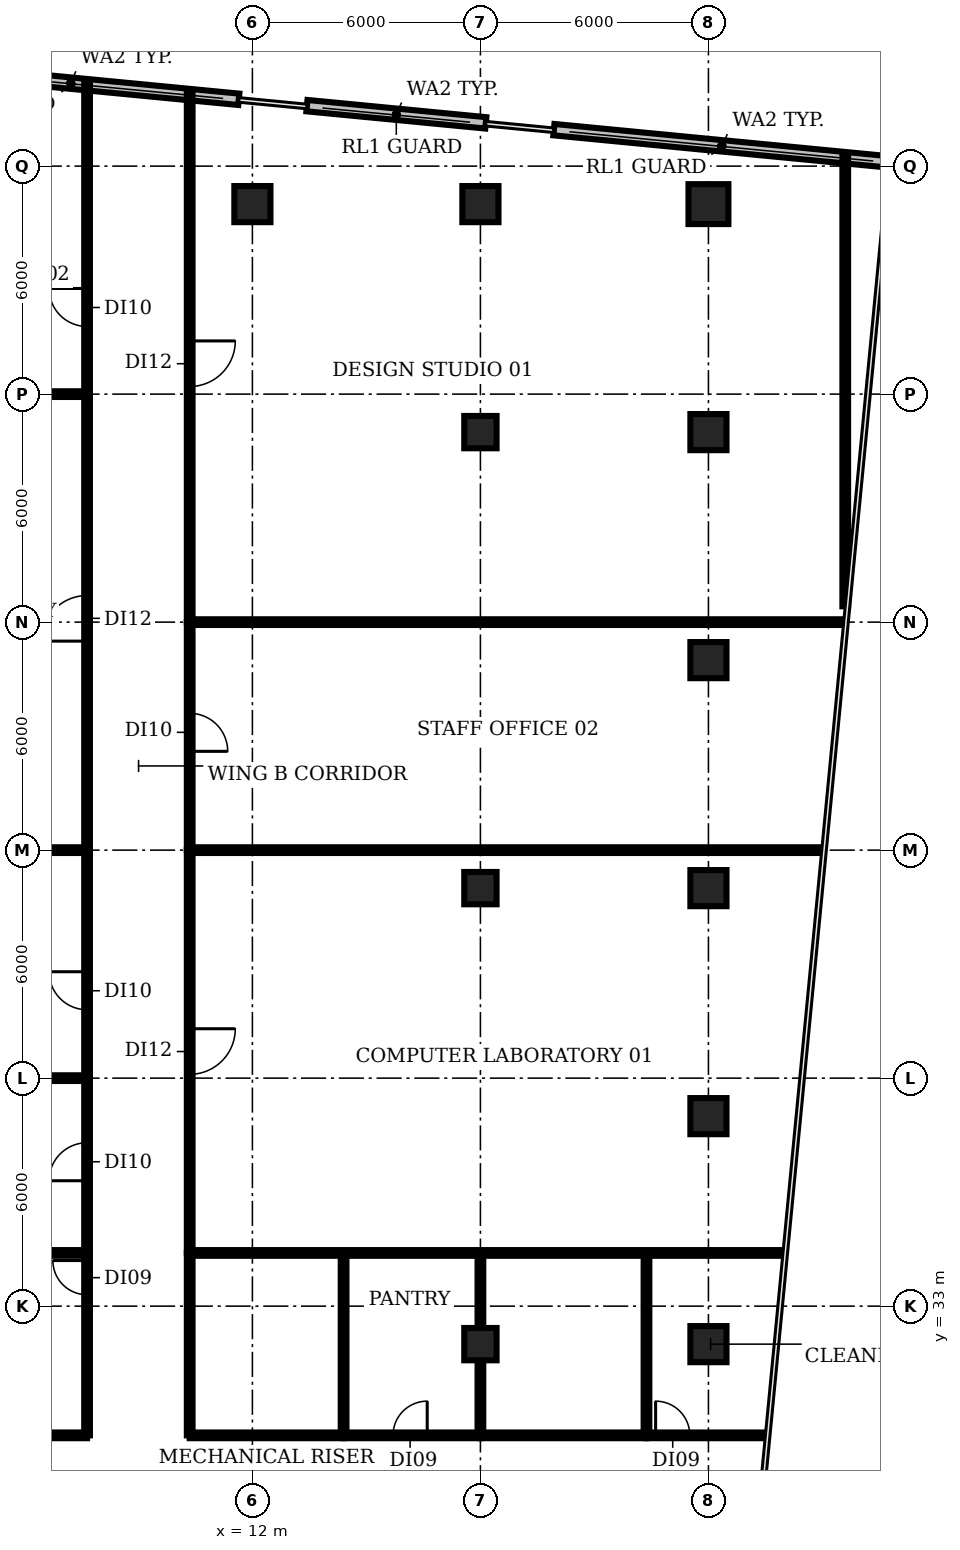
"""IFC4 building model, lengths in metres.
Left out: names, types, materials, properties, quantities, classifications, styles, units other than length and angle.
Written with IfcOpenShell. Run it as: python <this file> out.ifc"""

import sys

from ifc_helpers import new_model, si_unit, direction, frame, frame_2d, origin, origin_2d, place, context, subcontext, project, spatial, rectangle, circle, extrude, element, fill, save


model = new_model("IFC4")
c1 = context("Model", 3, precision=1e-05, world=origin(), true_north=direction((0.0, 1.0)))
c2 = subcontext(c1, "Body", "Model", "MODEL_VIEW")
j1 = project(units=[si_unit("LENGTHUNIT", "METRE"), si_unit("PLANEANGLEUNIT", "RADIAN")], contexts=[c1])
p1 = place(None, origin())
s1 = spatial("IfcSite", under=j1, at=p1, CompositionType="ELEMENT")
p2 = place(p1, origin())
s2 = spatial("IfcBuilding", under=s1, at=p2, CompositionType="ELEMENT")
p3 = place(p2, frame((0.0, 0.0, 29.0)))
s3 = spatial("IfcBuildingStorey", under=s2, at=p3, CompositionType="ELEMENT", Elevation=29.0)
p4 = place(p3, frame((12.0, 62.0, 0.0), z_axis=(0.0, 0.0, 1.0), x_axis=(1.0, 0.0, 0.0)))
e1 = element("IfcColumn", 1, at=p4, inside=s3, PredefinedType="COLUMN", context=c2, shape_type="SweptSolid", body=[
    extrude(rectangle(XDim=0.95, YDim=0.95, at=origin_2d()), origin(), (0.0, 0.0, 1.0), 3.85),
])
for number, where, z_axis, x_axis in (
    (2, (18.0, 32.0, 0.0), (0.0, 0.0, 1.0), (1.0, 0.0, 0.0)),
    (3, (18.0, 44.0, 0.0), (0.0, 0.0, 1.0), (1.0, 0.0, 0.0)),
    (4, (18.0, 56.0, 0.0), (0.0, 0.0, 1.0), (1.0, 0.0, 0.0)),
):
    element("IfcColumn", number, at=place(p3, frame(where, z_axis=z_axis, x_axis=x_axis)), inside=s3, PredefinedType="COLUMN", context=c2, shape_type="SweptSolid", body=[
        extrude(rectangle(XDim=0.85, YDim=0.85, at=origin_2d()), origin(), (0.0, 0.0, 1.0), 3.85),
    ])
for number, where, z_axis, x_axis in (
    (5, (18.0, 62.0, 0.0), (0.0, 0.0, 1.0), (1.0, 0.0, 0.0)),
    (6, (24.0, 32.0, 0.0), (0.0, 0.0, 1.0), (1.0, 0.0, 0.0)),
    (7, (24.0, 38.0, 0.0), (0.0, 0.0, 1.0), (1.0, 0.0, 0.0)),
    (8, (24.0, 44.0, 0.0), (0.0, 0.0, 1.0), (1.0, 0.0, 0.0)),
    (9, (24.0, 50.0, 0.0), (0.0, 0.0, 1.0), (1.0, 0.0, 0.0)),
    (10, (24.0, 56.0, 0.0), (0.0, 0.0, 1.0), (1.0, 0.0, 0.0)),
):
    element("IfcColumn", number, at=place(p3, frame(where, z_axis=z_axis, x_axis=x_axis)), inside=s3, PredefinedType="COLUMN", context=c2, shape_type="SweptSolid", body=[
        extrude(rectangle(XDim=0.95, YDim=0.95, at=origin_2d()), origin(), (0.0, 0.0, 1.0), 3.85),
    ])
p5 = place(p3, frame((24.0, 62.0, 0.0), z_axis=(0.0, 0.0, 1.0), x_axis=(1.0, 0.0, 0.0)))
e11 = element("IfcColumn", 11, at=p5, inside=s3, PredefinedType="COLUMN", context=c2, shape_type="SweptSolid", body=[
    extrude(circle(Radius=0.525, at=origin_2d()), origin(), (0.0, 0.0, 1.0), 3.85),
])
p6 = place(p3, frame((28.786, 63.107, 0.0), z_axis=(0.0, 0.0, 1.0), x_axis=(-0.995397352985, 0.095833760598, 0.0)))
e12 = element("IfcWall", 12, at=p6, inside=s3, PredefinedType="SOLIDWALL", context=c2, shape_type="SweptSolid", body=[
    extrude(rectangle(XDim=8.894, YDim=0.3, at=frame_2d((4.447, 0.0))), origin(), (0.0, 0.0, 1.0), 3.85),
])
p7 = place(p3, frame((18.142, 64.138, 0.0), z_axis=(0.0, 0.0, 1.0), x_axis=(-0.99539842865, 0.095822587322, 0.0)))
e13 = element("IfcWall", 13, at=p7, inside=s3, PredefinedType="SOLIDWALL", context=c2, shape_type="SweptSolid", body=[
    extrude(rectangle(XDim=4.729, YDim=0.3, at=frame_2d((2.364, 0.0))), origin(), (0.0, 0.0, 1.0), 3.85),
])
p8 = place(p3, frame((11.643, 64.758, 0.0), z_axis=(0.0, 0.0, 1.0), x_axis=(-0.995397352985, 0.095833760598, 0.0)))
e14 = element("IfcWall", 14, at=p8, inside=s3, PredefinedType="SOLIDWALL", context=c2, shape_type="SweptSolid", body=[
    extrude(rectangle(XDim=8.894, YDim=0.3, at=frame_2d((4.447, 0.0))), origin(), (0.0, 0.0, 1.0), 3.85),
])
for number, where, z_axis, x_axis in (
    (15, (-1.01, 34.4, 0.0), (0.0, 0.0, 1.0), (1.0, 0.0, 0.0)),
    (16, (-1.01, 39.0, 0.0), (0.0, 0.0, 1.0), (1.0, 0.0, 0.0)),
    (17, (-1.01, 45.0, 0.0), (0.0, 0.0, 1.0), (1.0, 0.0, 0.0)),
    (18, (-1.01, 57.0, 0.0), (0.0, 0.0, 1.0), (1.0, 0.0, 0.0)),
):
    element("IfcWall", number, at=place(p3, frame(where, z_axis=z_axis, x_axis=x_axis)), inside=s3, PredefinedType="PARTITIONING", context=c2, shape_type="SweptSolid", body=[
        extrude(rectangle(XDim=8.66, YDim=0.15, at=frame_2d((4.33, 0.0))), origin(), (0.0, 0.0, 1.0), 2.83),
    ])
p9 = place(p3, frame((2.4, 29.6, 0.0), z_axis=(0.0, 0.0, 1.0), x_axis=(1.0, 0.0, 0.0)))
e19 = element("IfcWall", 19, at=p9, inside=s3, PredefinedType="PARTITIONING", context=c2, shape_type="SweptSolid", body=[
    extrude(rectangle(XDim=5.25, YDim=0.15, at=frame_2d((2.625, 0.0))), origin(), (0.0, 0.0, 1.0), 2.83),
])
p10 = place(p3, frame((7.65, 29.6, 0.0), z_axis=(0.0, 0.0, 1.0), x_axis=(0.0, 1.0, 0.0)))
e20 = element("IfcWall", 20, at=p10, inside=s3, PredefinedType="PARTITIONING", context=c2, shape_type="SweptSolid", body=[
    extrude(rectangle(XDim=4.8, YDim=0.15, at=frame_2d((2.4, 0.0))), origin(), (0.0, 0.0, 1.0), 2.83),
])
p11 = place(p10, frame((3.7, 0.0, 0.0)))
e21 = element("IfcOpeningElement", 21, at=p11, cuts=e20, PredefinedType="OPENING", context=c2, shape_type="SweptSolid", body=[
    extrude(rectangle(XDim=0.9, YDim=2.1, at=frame_2d((0.45, 1.05))), frame((0.0, 0.085, 0.0), z_axis=(0.0, -1.0, 0.0), x_axis=(1.0, 0.0, 0.0)), (0.0, 0.0, 1.0), 0.17),
])
p12 = place(p3, frame((7.65, 34.4, 0.0), z_axis=(0.0, 0.0, 1.0), x_axis=(0.0, 1.0, 0.0)))
e22 = element("IfcWall", 22, at=p12, inside=s3, PredefinedType="PARTITIONING", context=c2, shape_type="SweptSolid", body=[
    extrude(rectangle(XDim=4.6, YDim=0.15, at=frame_2d((2.3, 0.0))), origin(), (0.0, 0.0, 1.0), 2.83),
])
p13 = place(p12, frame((1.9, 0.0, 0.0)))
e23 = element("IfcOpeningElement", 23, at=p13, cuts=e22, PredefinedType="OPENING", context=c2, shape_type="SweptSolid", body=[
    extrude(rectangle(XDim=1.0, YDim=2.1, at=frame_2d((0.5, 1.05))), frame((0.0, 0.085, 0.0), z_axis=(0.0, -1.0, 0.0), x_axis=(1.0, 0.0, 0.0)), (0.0, 0.0, 1.0), 0.17),
])
p14 = place(p3, frame((7.65, 39.0, 0.0), z_axis=(0.0, 0.0, 1.0), x_axis=(0.0, 1.0, 0.0)))
e24 = element("IfcWall", 24, at=p14, inside=s3, PredefinedType="PARTITIONING", context=c2, shape_type="SweptSolid", body=[
    extrude(rectangle(XDim=6.0, YDim=0.15, at=frame_2d((3.0, 0.0))), origin(), (0.0, 0.0, 1.0), 2.83),
])
p15 = place(p14, frame((1.8, 0.0, 0.0)))
e25 = element("IfcOpeningElement", 25, at=p15, cuts=e24, PredefinedType="OPENING", context=c2, shape_type="SweptSolid", body=[
    extrude(rectangle(XDim=1.0, YDim=2.1, at=frame_2d((0.5, 1.05))), frame((0.0, 0.085, 0.0), z_axis=(0.0, -1.0, 0.0), x_axis=(1.0, 0.0, 0.0)), (0.0, 0.0, 1.0), 0.17),
])
p16 = place(p3, frame((7.65, 45.0, 0.0), z_axis=(0.0, 0.0, 1.0), x_axis=(0.0, 1.0, 0.0)))
e26 = element("IfcWall", 26, at=p16, inside=s3, PredefinedType="PARTITIONING", context=c2, shape_type="SweptSolid", body=[
    extrude(rectangle(XDim=12.0, YDim=0.15, at=frame_2d((6.0, 0.0))), origin(), (0.0, 0.0, 1.0), 2.83),
])
p17 = place(p16, frame((5.5, 0.0, 0.0)))
e27 = element("IfcOpeningElement", 27, at=p17, cuts=e26, PredefinedType="OPENING", context=c2, shape_type="SweptSolid", body=[
    extrude(rectangle(XDim=1.2, YDim=2.1, at=frame_2d((0.6, 1.05))), frame((0.0, 0.085, 0.0), z_axis=(0.0, -1.0, 0.0), x_axis=(1.0, 0.0, 0.0)), (0.0, 0.0, 1.0), 0.17),
])
p18 = place(p3, frame((7.65, 57.0, 0.0), z_axis=(0.0, 0.0, 1.0), x_axis=(0.0, 1.0, 0.0)))
e28 = element("IfcWall", 28, at=p18, inside=s3, PredefinedType="PARTITIONING", context=c2, shape_type="SweptSolid", body=[
    extrude(rectangle(XDim=8.187, YDim=0.15, at=frame_2d((4.093, 0.0))), origin(), (0.0, 0.0, 1.0), 2.83),
])
p19 = place(p18, frame((1.78, 0.0, 0.0)))
e29 = element("IfcOpeningElement", 29, at=p19, cuts=e28, PredefinedType="OPENING", context=c2, shape_type="SweptSolid", body=[
    extrude(rectangle(XDim=1.0, YDim=2.1, at=frame_2d((0.5, 1.05))), frame((0.0, 0.085, 0.0), z_axis=(0.0, -1.0, 0.0), x_axis=(1.0, 0.0, 0.0)), (0.0, 0.0, 1.0), 0.17),
])
p20 = place(p3, frame((10.35, 29.6, 0.0), z_axis=(0.0, 0.0, 1.0), x_axis=(0.0, 1.0, 0.0)))
e30 = element("IfcWall", 30, at=p20, inside=s3, PredefinedType="PARTITIONING", context=c2, shape_type="SweptSolid", body=[
    extrude(rectangle(XDim=4.8, YDim=0.15, at=frame_2d((2.4, 0.0))), origin(), (0.0, 0.0, 1.0), 2.83),
])
p21 = place(p3, frame((10.35, 29.6, 0.0), z_axis=(0.0, 0.0, 1.0), x_axis=(1.0, 0.0, 0.0)))
e31 = element("IfcWall", 31, at=p21, inside=s3, PredefinedType="PARTITIONING", context=c2, shape_type="SweptSolid", body=[
    extrude(rectangle(XDim=4.05, YDim=0.15, at=frame_2d((2.025, 0.0))), origin(), (0.0, 0.0, 1.0), 2.83),
])
p22 = place(p3, frame((10.35, 34.4, 0.0), z_axis=(0.0, 0.0, 1.0), x_axis=(1.0, 0.0, 0.0)))
e32 = element("IfcWall", 32, at=p22, inside=s3, PredefinedType="PARTITIONING", context=c2, shape_type="SweptSolid", body=[
    extrude(rectangle(XDim=15.62, YDim=0.15, at=frame_2d((7.81, 0.0))), origin(), (0.0, 0.0, 1.0), 2.83),
])
p23 = place(p3, frame((10.35, 45.0, 0.0), z_axis=(0.0, 0.0, 1.0), x_axis=(0.0, -1.0, 0.0)))
e33 = element("IfcWall", 33, at=p23, inside=s3, PredefinedType="PARTITIONING", context=c2, shape_type="SweptSolid", body=[
    extrude(rectangle(XDim=10.6, YDim=0.15, at=frame_2d((5.3, 0.0))), origin(), (0.0, 0.0, 1.0), 2.83),
])
p24 = place(p23, frame((4.7, 0.0, 0.0)))
e34 = element("IfcOpeningElement", 34, at=p24, cuts=e33, PredefinedType="OPENING", context=c2, shape_type="SweptSolid", body=[
    extrude(rectangle(XDim=1.2, YDim=2.1, at=frame_2d((0.6, 1.05))), frame((0.0, 0.085, 0.0), z_axis=(0.0, -1.0, 0.0), x_axis=(1.0, 0.0, 0.0)), (0.0, 0.0, 1.0), 0.17),
])
p25 = place(p3, frame((10.35, 45.0, 0.0), z_axis=(0.0, 0.0, 1.0), x_axis=(1.0, 0.0, 0.0)))
e35 = element("IfcWall", 35, at=p25, inside=s3, PredefinedType="PARTITIONING", context=c2, shape_type="SweptSolid", body=[
    extrude(rectangle(XDim=16.615, YDim=0.15, at=frame_2d((8.307, 0.0))), origin(), (0.0, 0.0, 1.0), 2.83),
])
p26 = place(p3, frame((10.35, 51.0, 0.0), z_axis=(0.0, 0.0, 1.0), x_axis=(0.0, -1.0, 0.0)))
e36 = element("IfcWall", 36, at=p26, inside=s3, PredefinedType="PARTITIONING", context=c2, shape_type="SweptSolid", body=[
    extrude(rectangle(XDim=6.0, YDim=0.15, at=frame_2d((3.0, 0.0))), origin(), (0.0, 0.0, 1.0), 2.83),
])
p27 = place(p26, frame((2.4, 0.0, 0.0)))
e37 = element("IfcOpeningElement", 37, at=p27, cuts=e36, PredefinedType="OPENING", context=c2, shape_type="SweptSolid", body=[
    extrude(rectangle(XDim=1.0, YDim=2.1, at=frame_2d((0.5, 1.05))), frame((0.0, 0.085, 0.0), z_axis=(0.0, -1.0, 0.0), x_axis=(1.0, 0.0, 0.0)), (0.0, 0.0, 1.0), 0.17),
])
p28 = place(p3, frame((10.35, 51.0, 0.0), z_axis=(0.0, 0.0, 1.0), x_axis=(1.0, 0.0, 0.0)))
e38 = element("IfcWall", 38, at=p28, inside=s3, PredefinedType="PARTITIONING", context=c2, shape_type="SweptSolid", body=[
    extrude(rectangle(XDim=17.199, YDim=0.15, at=frame_2d((8.6, 0.0))), origin(), (0.0, 0.0, 1.0), 2.83),
])
p29 = place(p3, frame((10.35, 64.927, 0.0), z_axis=(0.0, 0.0, 1.0), x_axis=(0.0, -1.0, 0.0)))
e39 = element("IfcWall", 39, at=p29, inside=s3, PredefinedType="PARTITIONING", context=c2, shape_type="SweptSolid", body=[
    extrude(rectangle(XDim=13.927, YDim=0.15, at=frame_2d((6.963, 0.0))), origin(), (0.0, 0.0, 1.0), 2.83),
])
p30 = place(p29, frame((6.527, 0.0, 0.0)))
e40 = element("IfcOpeningElement", 40, at=p30, cuts=e39, PredefinedType="OPENING", context=c2, shape_type="SweptSolid", body=[
    extrude(rectangle(XDim=1.2, YDim=2.1, at=frame_2d((0.6, 1.05))), frame((0.0, 0.085, 0.0), z_axis=(0.0, -1.0, 0.0), x_axis=(1.0, 0.0, 0.0)), (0.0, 0.0, 1.0), 0.17),
])
p31 = place(p3, frame((14.4, 29.6, 0.0), z_axis=(0.0, 0.0, 1.0), x_axis=(0.0, 1.0, 0.0)))
e41 = element("IfcWall", 41, at=p31, inside=s3, PredefinedType="PARTITIONING", context=c2, shape_type="SweptSolid", body=[
    extrude(rectangle(XDim=4.8, YDim=0.15, at=frame_2d((2.4, 0.0))), origin(), (0.0, 0.0, 1.0), 2.83),
])
p32 = place(p3, frame((14.4, 29.6, 0.0), z_axis=(0.0, 0.0, 1.0), x_axis=(1.0, 0.0, 0.0)))
e42 = element("IfcWall", 42, at=p32, inside=s3, PredefinedType="PARTITIONING", context=c2, shape_type="SweptSolid", body=[
    extrude(rectangle(XDim=3.6, YDim=0.15, at=frame_2d((1.8, 0.0))), origin(), (0.0, 0.0, 1.0), 2.83),
])
p33 = place(p32, frame((1.3, 0.0, 0.0)))
e43 = element("IfcOpeningElement", 43, at=p33, cuts=e42, PredefinedType="OPENING", context=c2, shape_type="SweptSolid", body=[
    extrude(rectangle(XDim=0.9, YDim=2.1, at=frame_2d((0.45, 1.05))), frame((0.0, 0.085, 0.0), z_axis=(0.0, -1.0, 0.0), x_axis=(1.0, 0.0, 0.0)), (0.0, 0.0, 1.0), 0.17),
])
p34 = place(p3, frame((18.0, 29.6, 0.0), z_axis=(0.0, 0.0, 1.0), x_axis=(0.0, 1.0, 0.0)))
e44 = element("IfcWall", 44, at=p34, inside=s3, PredefinedType="PARTITIONING", context=c2, shape_type="SweptSolid", body=[
    extrude(rectangle(XDim=4.8, YDim=0.15, at=frame_2d((2.4, 0.0))), origin(), (0.0, 0.0, 1.0), 2.83),
])
p35 = place(p3, frame((18.0, 29.6, 0.0), z_axis=(0.0, 0.0, 1.0), x_axis=(1.0, 0.0, 0.0)))
e45 = element("IfcWall", 45, at=p35, inside=s3, PredefinedType="PARTITIONING", context=c2, shape_type="SweptSolid", body=[
    extrude(rectangle(XDim=4.37, YDim=0.15, at=frame_2d((2.185, 0.0))), origin(), (0.0, 0.0, 1.0), 2.83),
])
p36 = place(p3, frame((22.37, 29.6, 0.0), z_axis=(0.0, 0.0, 1.0), x_axis=(0.0, 1.0, 0.0)))
e46 = element("IfcWall", 46, at=p36, inside=s3, PredefinedType="PARTITIONING", context=c2, shape_type="SweptSolid", body=[
    extrude(rectangle(XDim=4.8, YDim=0.15, at=frame_2d((2.4, 0.0))), origin(), (0.0, 0.0, 1.0), 2.83),
])
p37 = place(p3, frame((22.37, 29.6, 0.0), z_axis=(0.0, 0.0, 1.0), x_axis=(1.0, 0.0, 0.0)))
e47 = element("IfcWall", 47, at=p37, inside=s3, PredefinedType="PARTITIONING", context=c2, shape_type="SweptSolid", body=[
    extrude(rectangle(XDim=3.14, YDim=0.15, at=frame_2d((1.57, 0.0))), origin(), (0.0, 0.0, 1.0), 2.83),
])
p38 = place(p37, frame((0.24, 0.0, 0.0)))
e48 = element("IfcOpeningElement", 48, at=p38, cuts=e47, PredefinedType="OPENING", context=c2, shape_type="SweptSolid", body=[
    extrude(rectangle(XDim=0.9, YDim=2.1, at=frame_2d((0.45, 1.05))), frame((0.0, 0.085, 0.0), z_axis=(0.0, -1.0, 0.0), x_axis=(1.0, 0.0, 0.0)), (0.0, 0.0, 1.0), 0.17),
])
p39 = place(p3, frame((27.6, 51.417, 0.0), z_axis=(0.0, 0.0, 1.0), x_axis=(0.0, 1.0, 0.0)))
e49 = element("IfcWall", 49, at=p39, inside=s3, PredefinedType="PARTITIONING", context=c2, shape_type="SweptSolid", body=[
    extrude(rectangle(XDim=11.849, YDim=0.15, at=frame_2d((5.924, 0.0))), origin(), (0.0, 0.0, 1.0), 2.83),
])
p40 = place(p11, origin())
e50 = element("IfcDoor", 50, at=p40, inside=s3, OperationType="SINGLE_SWING_RIGHT", PredefinedType="DOOR", context=c2, shape_type="SweptSolid", body=[
    extrude(rectangle(XDim=0.9, YDim=2.1, at=frame_2d((0.45, 1.05))), frame((0.0, 0.025, 0.0), z_axis=(0.0, -1.0, 0.0), x_axis=(1.0, 0.0, 0.0)), (0.0, 0.0, 1.0), 0.05),
])
fill(e21, e50)
p41 = place(p13, origin())
e51 = element("IfcDoor", 51, at=p41, inside=s3, OperationType="SINGLE_SWING_LEFT", PredefinedType="DOOR", context=c2, shape_type="SweptSolid", body=[
    extrude(rectangle(XDim=1.0, YDim=2.1, at=frame_2d((0.5, 1.05))), frame((0.0, 0.025, 0.0), z_axis=(0.0, -1.0, 0.0), x_axis=(1.0, 0.0, 0.0)), (0.0, 0.0, 1.0), 0.05),
])
fill(e23, e51)
p42 = place(p15, origin())
e52 = element("IfcDoor", 52, at=p42, inside=s3, OperationType="SINGLE_SWING_RIGHT", PredefinedType="DOOR", context=c2, shape_type="SweptSolid", body=[
    extrude(rectangle(XDim=1.0, YDim=2.1, at=frame_2d((0.5, 1.05))), frame((0.0, 0.025, 0.0), z_axis=(0.0, -1.0, 0.0), x_axis=(1.0, 0.0, 0.0)), (0.0, 0.0, 1.0), 0.05),
])
fill(e25, e52)
p43 = place(p17, origin())
e53 = element("IfcDoor", 53, at=p43, inside=s3, OperationType="SINGLE_SWING_LEFT", PredefinedType="DOOR", context=c2, shape_type="SweptSolid", body=[
    extrude(rectangle(XDim=1.2, YDim=2.1, at=frame_2d((0.6, 1.05))), frame((0.0, 0.025, 0.0), z_axis=(0.0, -1.0, 0.0), x_axis=(1.0, 0.0, 0.0)), (0.0, 0.0, 1.0), 0.05),
])
fill(e27, e53)
p44 = place(p19, origin())
e54 = element("IfcDoor", 54, at=p44, inside=s3, OperationType="SINGLE_SWING_RIGHT", PredefinedType="DOOR", context=c2, shape_type="SweptSolid", body=[
    extrude(rectangle(XDim=1.0, YDim=2.1, at=frame_2d((0.5, 1.05))), frame((0.0, 0.025, 0.0), z_axis=(0.0, -1.0, 0.0), x_axis=(1.0, 0.0, 0.0)), (0.0, 0.0, 1.0), 0.05),
])
fill(e29, e54)
p45 = place(p24, origin())
e55 = element("IfcDoor", 55, at=p45, inside=s3, OperationType="SINGLE_SWING_LEFT", PredefinedType="DOOR", context=c2, shape_type="SweptSolid", body=[
    extrude(rectangle(XDim=1.2, YDim=2.1, at=frame_2d((0.6, 1.05))), frame((0.0, 0.025, 0.0), z_axis=(0.0, -1.0, 0.0), x_axis=(1.0, 0.0, 0.0)), (0.0, 0.0, 1.0), 0.05),
])
fill(e34, e55)
p46 = place(p27, origin())
e56 = element("IfcDoor", 56, at=p46, inside=s3, OperationType="SINGLE_SWING_RIGHT", PredefinedType="DOOR", context=c2, shape_type="SweptSolid", body=[
    extrude(rectangle(XDim=1.0, YDim=2.1, at=frame_2d((0.5, 1.05))), frame((0.0, 0.025, 0.0), z_axis=(0.0, -1.0, 0.0), x_axis=(1.0, 0.0, 0.0)), (0.0, 0.0, 1.0), 0.05),
])
fill(e37, e56)
p47 = place(p30, origin())
e57 = element("IfcDoor", 57, at=p47, inside=s3, OperationType="SINGLE_SWING_LEFT", PredefinedType="DOOR", context=c2, shape_type="SweptSolid", body=[
    extrude(rectangle(XDim=1.2, YDim=2.1, at=frame_2d((0.6, 1.05))), frame((0.0, 0.025, 0.0), z_axis=(0.0, -1.0, 0.0), x_axis=(1.0, 0.0, 0.0)), (0.0, 0.0, 1.0), 0.05),
])
fill(e40, e57)
p48 = place(p33, origin())
e58 = element("IfcDoor", 58, at=p48, inside=s3, OperationType="SINGLE_SWING_RIGHT", PredefinedType="DOOR", context=c2, shape_type="SweptSolid", body=[
    extrude(rectangle(XDim=0.9, YDim=2.1, at=frame_2d((0.45, 1.05))), frame((0.0, 0.025, 0.0), z_axis=(0.0, -1.0, 0.0), x_axis=(1.0, 0.0, 0.0)), (0.0, 0.0, 1.0), 0.05),
])
fill(e43, e58)
p49 = place(p38, origin())
e59 = element("IfcDoor", 59, at=p49, inside=s3, OperationType="SINGLE_SWING_LEFT", PredefinedType="DOOR", context=c2, shape_type="SweptSolid", body=[
    extrude(rectangle(XDim=0.9, YDim=2.1, at=frame_2d((0.45, 1.05))), frame((0.0, 0.025, 0.0), z_axis=(0.0, -1.0, 0.0), x_axis=(1.0, 0.0, 0.0)), (0.0, 0.0, 1.0), 0.05),
])
fill(e48, e59)
save(model, sys.argv[1])
